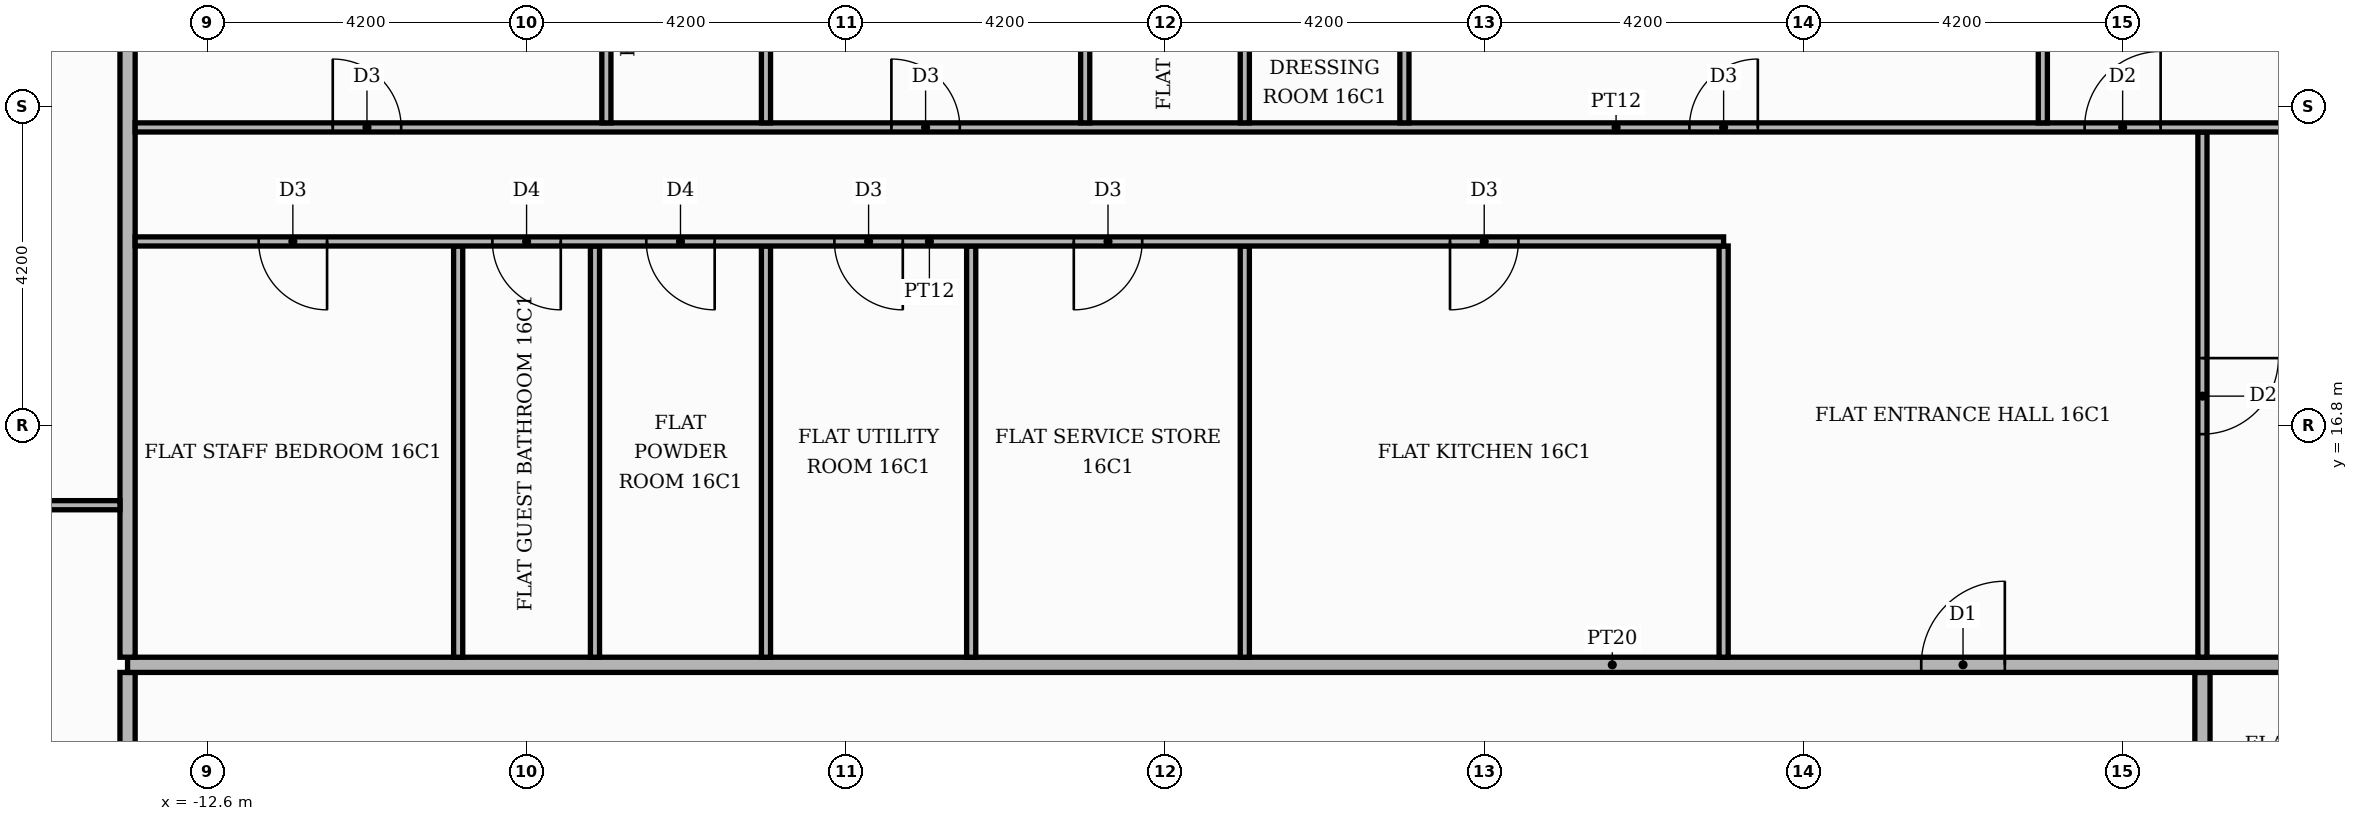
"""IFC4 building model, lengths in metres.
Left out: names, types, materials, properties, quantities, classifications, styles, units other than length and angle.
Written with IfcOpenShell. Run it as: python <this file> out.ifc"""

import sys

from ifc_helpers import new_model, si_unit, direction, frame, frame_2d, origin, place, context, subcontext, project, spatial, rectangle, extrude, element, fill, save


model = new_model("IFC4")
c1 = context("Model", 3, precision=1e-05, world=origin(), true_north=direction((0.0, 1.0)))
c2 = subcontext(c1, "Body", "Model", "MODEL_VIEW")
j1 = project(units=[si_unit("LENGTHUNIT", "METRE"), si_unit("PLANEANGLEUNIT", "RADIAN")], contexts=[c1])
p1 = place(None, origin())
s1 = spatial("IfcSite", under=j1, at=p1, CompositionType="ELEMENT")
p2 = place(p1, origin())
s2 = spatial("IfcBuilding", under=s1, at=p2, CompositionType="ELEMENT")
p3 = place(p2, frame((0.0, 0.0, 69.9)))
s3 = spatial("IfcBuildingStorey", under=s2, at=p3, CompositionType="ELEMENT", Elevation=69.9)
p4 = place(p3, frame((13.65, -5.15, 0.0), z_axis=(0.0, 0.0, 1.0), x_axis=(0.0, 1.0, 0.0)))
e1 = element("IfcWall", 1, at=p4, inside=s3, PredefinedType="PARTITIONING", context=c2, shape_type="SweptSolid", body=[
    extrude(rectangle(XDim=18.7, YDim=0.2, at=frame_2d((9.35, 0.0))), origin(), (0.0, 0.0, 1.0), 3.4),
])
p5 = place(p4, frame((5.65, 0.0, 0.0)))
e2 = element("IfcOpeningElement", 2, at=p5, cuts=e1, PredefinedType="OPENING", context=c2, shape_type="SweptSolid", body=[
    extrude(rectangle(XDim=1.1, YDim=2.4, at=frame_2d((0.55, 1.2))), frame((0.0, 0.11, 0.0), z_axis=(0.0, -1.0, 0.0), x_axis=(1.0, 0.0, 0.0)), (0.0, 0.0, 1.0), 0.22),
])
p6 = place(p3, frame((-13.65, 5.35, 0.0), z_axis=(0.0, 0.0, 1.0), x_axis=(0.0, 1.0, 0.0)))
e3 = element("IfcWall", 3, at=p6, inside=s3, PredefinedType="PARTITIONING", context=c2, shape_type="SweptSolid", body=[
    extrude(rectangle(XDim=8.2, YDim=0.2, at=frame_2d((4.1, 0.0))), origin(), (0.0, 0.0, 1.0), 3.4),
])
p7 = place(p6, frame((5.65, 0.0, 0.0)))
e4 = element("IfcOpeningElement", 4, at=p7, cuts=e3, PredefinedType="OPENING", context=c2, shape_type="SweptSolid", body=[
    extrude(rectangle(XDim=1.1, YDim=2.4, at=frame_2d((0.55, 1.2))), frame((0.0, 0.11, 0.0), z_axis=(0.0, -1.0, 0.0), x_axis=(1.0, 0.0, 0.0)), (0.0, 0.0, 1.0), 0.22),
])
p8 = place(p3, frame((-13.65, 13.65, 0.0), z_axis=(0.0, 0.0, 1.0), x_axis=(1.0, 0.0, 0.0)))
e5 = element("IfcWall", 5, at=p8, inside=s3, PredefinedType="PARTITIONING", context=c2, shape_type="SweptSolid", body=[
    extrude(rectangle(XDim=39.07, YDim=0.2, at=frame_2d((19.535, 0.0))), origin(), (0.0, 0.0, 1.0), 3.4),
])
p9 = place(p8, frame((23.6, 0.0, 0.0)))
e6 = element("IfcOpeningElement", 6, at=p9, cuts=e5, PredefinedType="OPENING", context=c2, shape_type="SweptSolid", body=[
    extrude(rectangle(XDim=1.1, YDim=2.4, at=frame_2d((0.55, 1.2))), frame((0.0, 0.11, 0.0), z_axis=(0.0, -1.0, 0.0), x_axis=(1.0, 0.0, 0.0)), (0.0, 0.0, 1.0), 0.22),
])
p10 = place(p3, frame((-13.65, 13.75, 0.0), z_axis=(0.0, 0.0, 1.0), x_axis=(0.0, 1.0, 0.0)))
e7 = element("IfcWall", 7, at=p10, inside=s3, PredefinedType="PARTITIONING", context=c2, shape_type="SweptSolid", body=[
    extrude(rectangle(XDim=11.67, YDim=0.2, at=frame_2d((5.835, 0.0))), origin(), (0.0, 0.0, 1.0), 3.4),
])
for number, where, z_axis, x_axis in (
    (8, (-9.3, 13.75, 0.0), (0.0, 0.0, 1.0), (0.0, 1.0, 0.0)),
    (9, (-7.5, 13.75, 0.0), (0.0, 0.0, 1.0), (0.0, 1.0, 0.0)),
    (10, (-5.25, 13.75, 0.0), (0.0, 0.0, 1.0), (0.0, 1.0, 0.0)),
    (11, (-2.55, 13.75, 0.0), (0.0, 0.0, 1.0), (0.0, 1.0, 0.0)),
    (12, (1.05, 13.75, 0.0), (0.0, 0.0, 1.0), (0.0, 1.0, 0.0)),
    (13, (7.35, 13.75, 0.0), (0.0, 0.0, 1.0), (0.0, 1.0, 0.0)),
):
    element("IfcWall", number, at=place(p3, frame(where, z_axis=z_axis, x_axis=x_axis)), inside=s3, PredefinedType="PARTITIONING", context=c2, shape_type="SweptSolid", body=[
        extrude(rectangle(XDim=5.41, YDim=0.12, at=frame_2d((2.705, 0.0))), origin(), (0.0, 0.0, 1.0), 3.4),
    ])
p11 = place(p3, frame((13.65, 13.75, 0.0), z_axis=(0.0, 0.0, 1.0), x_axis=(0.0, 1.0, 0.0)))
e14 = element("IfcWall", 14, at=p11, inside=s3, PredefinedType="PARTITIONING", context=c2, shape_type="SweptSolid", body=[
    extrude(rectangle(XDim=6.91, YDim=0.12, at=frame_2d((3.455, 0.0))), origin(), (0.0, 0.0, 1.0), 3.4),
])
p12 = place(p11, frame((2.935, 0.0, 0.0)))
e15 = element("IfcOpeningElement", 15, at=p12, cuts=e14, PredefinedType="OPENING", context=c2, shape_type="SweptSolid", body=[
    extrude(rectangle(XDim=1.0, YDim=2.1, at=frame_2d((0.5, 1.05))), frame((0.0, 0.07, 0.0), z_axis=(0.0, -1.0, 0.0), x_axis=(1.0, 0.0, 0.0)), (0.0, 0.0, 1.0), 0.14),
])
p13 = place(p3, frame((-20.12, 15.75, 0.0), z_axis=(0.0, 0.0, 1.0), x_axis=(1.0, 0.0, 0.0)))
e16 = element("IfcWall", 16, at=p13, inside=s3, PredefinedType="PARTITIONING", context=c2, shape_type="SweptSolid", body=[
    extrude(rectangle(XDim=6.37, YDim=0.12, at=frame_2d((3.185, 0.0))), origin(), (0.0, 0.0, 1.0), 3.4),
])
p14 = place(p13, frame((2.735, 0.0, 0.0)))
e17 = element("IfcOpeningElement", 17, at=p14, cuts=e16, PredefinedType="OPENING", context=c2, shape_type="SweptSolid", body=[
    extrude(rectangle(XDim=1.0, YDim=2.1, at=frame_2d((0.5, 1.05))), frame((0.0, 0.07, 0.0), z_axis=(0.0, -1.0, 0.0), x_axis=(1.0, 0.0, 0.0)), (0.0, 0.0, 1.0), 0.14),
])
p15 = place(p3, frame((-13.55, 19.22, 0.0), z_axis=(0.0, 0.0, 1.0), x_axis=(1.0, 0.0, 0.0)))
e18 = element("IfcWall", 18, at=p15, inside=s3, PredefinedType="PARTITIONING", context=c2, shape_type="SweptSolid", body=[
    extrude(rectangle(XDim=20.9, YDim=0.12, at=frame_2d((10.45, 0.0))), origin(), (0.0, 0.0, 1.0), 3.4),
])
p16 = place(p15, frame((17.3, 0.0, 0.0)))
e19 = element("IfcOpeningElement", 19, at=p16, cuts=e18, PredefinedType="OPENING", context=c2, shape_type="SweptSolid", body=[
    extrude(rectangle(XDim=0.9, YDim=2.1, at=frame_2d((0.45, 1.05))), frame((0.0, 0.07, 0.0), z_axis=(0.0, -1.0, 0.0), x_axis=(1.0, 0.0, 0.0)), (0.0, 0.0, 1.0), 0.14),
])
p17 = place(p15, frame((12.35, 0.0, 0.0)))
e20 = element("IfcOpeningElement", 20, at=p17, cuts=e18, PredefinedType="OPENING", context=c2, shape_type="SweptSolid", body=[
    extrude(rectangle(XDim=0.9, YDim=2.1, at=frame_2d((0.45, 1.05))), frame((0.0, 0.07, 0.0), z_axis=(0.0, -1.0, 0.0), x_axis=(1.0, 0.0, 0.0)), (0.0, 0.0, 1.0), 0.14),
])
p18 = place(p15, frame((9.2, 0.0, 0.0)))
e21 = element("IfcOpeningElement", 21, at=p18, cuts=e18, PredefinedType="OPENING", context=c2, shape_type="SweptSolid", body=[
    extrude(rectangle(XDim=0.9, YDim=2.1, at=frame_2d((0.45, 1.05))), frame((0.0, 0.07, 0.0), z_axis=(0.0, -1.0, 0.0), x_axis=(1.0, 0.0, 0.0)), (0.0, 0.0, 1.0), 0.14),
])
p19 = place(p15, frame((6.725, 0.0, 0.0)))
e22 = element("IfcOpeningElement", 22, at=p19, cuts=e18, PredefinedType="OPENING", context=c2, shape_type="SweptSolid", body=[
    extrude(rectangle(XDim=0.9, YDim=2.1, at=frame_2d((0.45, 1.05))), frame((0.0, 0.07, 0.0), z_axis=(0.0, -1.0, 0.0), x_axis=(1.0, 0.0, 0.0)), (0.0, 0.0, 1.0), 0.14),
])
p20 = place(p15, frame((4.7, 0.0, 0.0)))
e23 = element("IfcOpeningElement", 23, at=p20, cuts=e18, PredefinedType="OPENING", context=c2, shape_type="SweptSolid", body=[
    extrude(rectangle(XDim=0.9, YDim=2.1, at=frame_2d((0.45, 1.05))), frame((0.0, 0.07, 0.0), z_axis=(0.0, -1.0, 0.0), x_axis=(1.0, 0.0, 0.0)), (0.0, 0.0, 1.0), 0.14),
])
p21 = place(p15, frame((1.625, 0.0, 0.0)))
e24 = element("IfcOpeningElement", 24, at=p21, cuts=e18, PredefinedType="OPENING", context=c2, shape_type="SweptSolid", body=[
    extrude(rectangle(XDim=0.9, YDim=2.1, at=frame_2d((0.45, 1.05))), frame((0.0, 0.07, 0.0), z_axis=(0.0, -1.0, 0.0), x_axis=(1.0, 0.0, 0.0)), (0.0, 0.0, 1.0), 0.14),
])
p22 = place(p3, frame((-13.55, 20.72, 0.0), z_axis=(0.0, 0.0, 1.0), x_axis=(1.0, 0.0, 0.0)))
e25 = element("IfcWall", 25, at=p22, inside=s3, PredefinedType="PARTITIONING", context=c2, shape_type="SweptSolid", body=[
    extrude(rectangle(XDim=38.97, YDim=0.12, at=frame_2d((19.485, 0.0))), origin(), (0.0, 0.0, 1.0), 3.4),
])
p23 = place(p22, frame((25.65, 0.0, 0.0)))
e26 = element("IfcOpeningElement", 26, at=p23, cuts=e25, PredefinedType="OPENING", context=c2, shape_type="SweptSolid", body=[
    extrude(rectangle(XDim=1.0, YDim=2.1, at=frame_2d((0.5, 1.05))), frame((0.0, 0.07, 0.0), z_axis=(0.0, -1.0, 0.0), x_axis=(1.0, 0.0, 0.0)), (0.0, 0.0, 1.0), 0.14),
])
p24 = place(p22, frame((20.45, 0.0, 0.0)))
e27 = element("IfcOpeningElement", 27, at=p24, cuts=e25, PredefinedType="OPENING", context=c2, shape_type="SweptSolid", body=[
    extrude(rectangle(XDim=0.9, YDim=2.1, at=frame_2d((0.45, 1.05))), frame((0.0, 0.07, 0.0), z_axis=(0.0, -1.0, 0.0), x_axis=(1.0, 0.0, 0.0)), (0.0, 0.0, 1.0), 0.14),
])
p25 = place(p22, frame((9.95, 0.0, 0.0)))
e28 = element("IfcOpeningElement", 28, at=p25, cuts=e25, PredefinedType="OPENING", context=c2, shape_type="SweptSolid", body=[
    extrude(rectangle(XDim=0.9, YDim=2.1, at=frame_2d((0.45, 1.05))), frame((0.0, 0.07, 0.0), z_axis=(0.0, -1.0, 0.0), x_axis=(1.0, 0.0, 0.0)), (0.0, 0.0, 1.0), 0.14),
])
p26 = place(p22, frame((2.6, 0.0, 0.0)))
e29 = element("IfcOpeningElement", 29, at=p26, cuts=e25, PredefinedType="OPENING", context=c2, shape_type="SweptSolid", body=[
    extrude(rectangle(XDim=0.9, YDim=2.1, at=frame_2d((0.45, 1.05))), frame((0.0, 0.07, 0.0), z_axis=(0.0, -1.0, 0.0), x_axis=(1.0, 0.0, 0.0)), (0.0, 0.0, 1.0), 0.14),
])
p27 = place(p3, frame((-7.35, 20.78, 0.0), z_axis=(0.0, 0.0, 1.0), x_axis=(0.0, 1.0, 0.0)))
e30 = element("IfcWall", 30, at=p27, inside=s3, PredefinedType="PARTITIONING", context=c2, shape_type="SweptSolid", body=[
    extrude(rectangle(XDim=4.64, YDim=0.12, at=frame_2d((2.32, 0.0))), origin(), (0.0, 0.0, 1.0), 3.4),
])
p28 = place(p3, frame((-5.25, 20.78, 0.0), z_axis=(0.0, 0.0, 1.0), x_axis=(0.0, 1.0, 0.0)))
e31 = element("IfcWall", 31, at=p28, inside=s3, PredefinedType="PARTITIONING", context=c2, shape_type="SweptSolid", body=[
    extrude(rectangle(XDim=4.64, YDim=0.12, at=frame_2d((2.32, 0.0))), origin(), (0.0, 0.0, 1.0), 3.4),
])
p29 = place(p28, frame((1.99, 0.0, 0.0)))
e32 = element("IfcOpeningElement", 32, at=p29, cuts=e31, PredefinedType="OPENING", context=c2, shape_type="SweptSolid", body=[
    extrude(rectangle(XDim=0.9, YDim=2.1, at=frame_2d((0.45, 1.05))), frame((0.0, 0.07, 0.0), z_axis=(0.0, -1.0, 0.0), x_axis=(1.0, 0.0, 0.0)), (0.0, 0.0, 1.0), 0.14),
])
p30 = place(p3, frame((-1.05, 20.78, 0.0), z_axis=(0.0, 0.0, 1.0), x_axis=(0.0, 1.0, 0.0)))
e33 = element("IfcWall", 33, at=p30, inside=s3, PredefinedType="PARTITIONING", context=c2, shape_type="SweptSolid", body=[
    extrude(rectangle(XDim=4.64, YDim=0.12, at=frame_2d((2.32, 0.0))), origin(), (0.0, 0.0, 1.0), 3.4),
])
p31 = place(p3, frame((1.05, 20.78, 0.0), z_axis=(0.0, 0.0, 1.0), x_axis=(0.0, 1.0, 0.0)))
e34 = element("IfcWall", 34, at=p31, inside=s3, PredefinedType="PARTITIONING", context=c2, shape_type="SweptSolid", body=[
    extrude(rectangle(XDim=4.64, YDim=0.12, at=frame_2d((2.32, 0.0))), origin(), (0.0, 0.0, 1.0), 3.4),
])
p32 = place(p31, frame((1.99, 0.0, 0.0)))
e35 = element("IfcOpeningElement", 35, at=p32, cuts=e34, PredefinedType="OPENING", context=c2, shape_type="SweptSolid", body=[
    extrude(rectangle(XDim=0.9, YDim=2.1, at=frame_2d((0.45, 1.05))), frame((0.0, 0.07, 0.0), z_axis=(0.0, -1.0, 0.0), x_axis=(1.0, 0.0, 0.0)), (0.0, 0.0, 1.0), 0.14),
])
p33 = place(p3, frame((3.15, 20.78, 0.0), z_axis=(0.0, 0.0, 1.0), x_axis=(0.0, 1.0, 0.0)))
e36 = element("IfcWall", 36, at=p33, inside=s3, PredefinedType="PARTITIONING", context=c2, shape_type="SweptSolid", body=[
    extrude(rectangle(XDim=4.64, YDim=0.12, at=frame_2d((2.32, 0.0))), origin(), (0.0, 0.0, 1.0), 3.4),
])
p34 = place(p33, frame((1.99, 0.0, 0.0)))
e37 = element("IfcOpeningElement", 37, at=p34, cuts=e36, PredefinedType="OPENING", context=c2, shape_type="SweptSolid", body=[
    extrude(rectangle(XDim=0.9, YDim=2.1, at=frame_2d((0.45, 1.05))), frame((0.0, 0.07, 0.0), z_axis=(0.0, -1.0, 0.0), x_axis=(1.0, 0.0, 0.0)), (0.0, 0.0, 1.0), 0.14),
])
p35 = place(p3, frame((11.55, 20.78, 0.0), z_axis=(0.0, 0.0, 1.0), x_axis=(0.0, 1.0, 0.0)))
e38 = element("IfcWall", 38, at=p35, inside=s3, PredefinedType="PARTITIONING", context=c2, shape_type="SweptSolid", body=[
    extrude(rectangle(XDim=4.64, YDim=0.12, at=frame_2d((2.32, 0.0))), origin(), (0.0, 0.0, 1.0), 3.4),
])
p36 = place(p9, origin())
e39 = element("IfcDoor", 39, at=p36, inside=s3, OperationType="SINGLE_SWING_RIGHT", PredefinedType="DOOR", context=c2, shape_type="SweptSolid", body=[
    extrude(rectangle(XDim=1.1, YDim=2.4, at=frame_2d((0.55, 1.2))), frame((0.0, 0.025, 0.0), z_axis=(0.0, -1.0, 0.0), x_axis=(1.0, 0.0, 0.0)), (0.0, 0.0, 1.0), 0.05),
])
fill(e6, e39)
p37 = place(p12, frame((1.0, 0.0, 0.0), z_axis=(0.0, 0.0, 1.0), x_axis=(-1.0, 0.0, 0.0)))
e40 = element("IfcDoor", 40, at=p37, inside=s3, OperationType="SINGLE_SWING_RIGHT", PredefinedType="DOOR", context=c2, shape_type="SweptSolid", body=[
    extrude(rectangle(XDim=1.0, YDim=2.1, at=frame_2d((0.5, 1.05))), frame((0.0, 0.025, 0.0), z_axis=(0.0, -1.0, 0.0), x_axis=(1.0, 0.0, 0.0)), (0.0, 0.0, 1.0), 0.05),
])
fill(e15, e40)
p38 = place(p16, frame((0.9, 0.0, 0.0), z_axis=(0.0, 0.0, 1.0), x_axis=(-1.0, 0.0, 0.0)))
e41 = element("IfcDoor", 41, at=p38, inside=s3, OperationType="SINGLE_SWING_LEFT", PredefinedType="DOOR", context=c2, shape_type="SweptSolid", body=[
    extrude(rectangle(XDim=0.9, YDim=2.1, at=frame_2d((0.45, 1.05))), frame((0.0, 0.025, 0.0), z_axis=(0.0, -1.0, 0.0), x_axis=(1.0, 0.0, 0.0)), (0.0, 0.0, 1.0), 0.05),
])
fill(e19, e41)
p39 = place(p17, frame((0.9, 0.0, 0.0), z_axis=(0.0, 0.0, 1.0), x_axis=(-1.0, 0.0, 0.0)))
e42 = element("IfcDoor", 42, at=p39, inside=s3, OperationType="SINGLE_SWING_LEFT", PredefinedType="DOOR", context=c2, shape_type="SweptSolid", body=[
    extrude(rectangle(XDim=0.9, YDim=2.1, at=frame_2d((0.45, 1.05))), frame((0.0, 0.025, 0.0), z_axis=(0.0, -1.0, 0.0), x_axis=(1.0, 0.0, 0.0)), (0.0, 0.0, 1.0), 0.05),
])
fill(e20, e42)
p40 = place(p18, frame((0.9, 0.0, 0.0), z_axis=(0.0, 0.0, 1.0), x_axis=(-1.0, 0.0, 0.0)))
e43 = element("IfcDoor", 43, at=p40, inside=s3, OperationType="SINGLE_SWING_RIGHT", PredefinedType="DOOR", context=c2, shape_type="SweptSolid", body=[
    extrude(rectangle(XDim=0.9, YDim=2.1, at=frame_2d((0.45, 1.05))), frame((0.0, 0.025, 0.0), z_axis=(0.0, -1.0, 0.0), x_axis=(1.0, 0.0, 0.0)), (0.0, 0.0, 1.0), 0.05),
])
fill(e21, e43)
p41 = place(p19, frame((0.9, 0.0, 0.0), z_axis=(0.0, 0.0, 1.0), x_axis=(-1.0, 0.0, 0.0)))
e44 = element("IfcDoor", 44, at=p41, inside=s3, OperationType="SINGLE_SWING_RIGHT", PredefinedType="DOOR", context=c2, shape_type="SweptSolid", body=[
    extrude(rectangle(XDim=0.9, YDim=2.1, at=frame_2d((0.45, 1.05))), frame((0.0, 0.025, 0.0), z_axis=(0.0, -1.0, 0.0), x_axis=(1.0, 0.0, 0.0)), (0.0, 0.0, 1.0), 0.05),
])
fill(e22, e44)
p42 = place(p20, frame((0.9, 0.0, 0.0), z_axis=(0.0, 0.0, 1.0), x_axis=(-1.0, 0.0, 0.0)))
e45 = element("IfcDoor", 45, at=p42, inside=s3, OperationType="SINGLE_SWING_RIGHT", PredefinedType="DOOR", context=c2, shape_type="SweptSolid", body=[
    extrude(rectangle(XDim=0.9, YDim=2.1, at=frame_2d((0.45, 1.05))), frame((0.0, 0.025, 0.0), z_axis=(0.0, -1.0, 0.0), x_axis=(1.0, 0.0, 0.0)), (0.0, 0.0, 1.0), 0.05),
])
fill(e23, e45)
p43 = place(p21, frame((0.9, 0.0, 0.0), z_axis=(0.0, 0.0, 1.0), x_axis=(-1.0, 0.0, 0.0)))
e46 = element("IfcDoor", 46, at=p43, inside=s3, OperationType="SINGLE_SWING_RIGHT", PredefinedType="DOOR", context=c2, shape_type="SweptSolid", body=[
    extrude(rectangle(XDim=0.9, YDim=2.1, at=frame_2d((0.45, 1.05))), frame((0.0, 0.025, 0.0), z_axis=(0.0, -1.0, 0.0), x_axis=(1.0, 0.0, 0.0)), (0.0, 0.0, 1.0), 0.05),
])
fill(e24, e46)
p44 = place(p23, origin())
e47 = element("IfcDoor", 47, at=p44, inside=s3, OperationType="SINGLE_SWING_RIGHT", PredefinedType="DOOR", context=c2, shape_type="SweptSolid", body=[
    extrude(rectangle(XDim=1.0, YDim=2.1, at=frame_2d((0.5, 1.05))), frame((0.0, 0.025, 0.0), z_axis=(0.0, -1.0, 0.0), x_axis=(1.0, 0.0, 0.0)), (0.0, 0.0, 1.0), 0.05),
])
fill(e26, e47)
p45 = place(p24, origin())
e48 = element("IfcDoor", 48, at=p45, inside=s3, OperationType="SINGLE_SWING_RIGHT", PredefinedType="DOOR", context=c2, shape_type="SweptSolid", body=[
    extrude(rectangle(XDim=0.9, YDim=2.1, at=frame_2d((0.45, 1.05))), frame((0.0, 0.025, 0.0), z_axis=(0.0, -1.0, 0.0), x_axis=(1.0, 0.0, 0.0)), (0.0, 0.0, 1.0), 0.05),
])
fill(e27, e48)
p46 = place(p25, origin())
e49 = element("IfcDoor", 49, at=p46, inside=s3, OperationType="SINGLE_SWING_LEFT", PredefinedType="DOOR", context=c2, shape_type="SweptSolid", body=[
    extrude(rectangle(XDim=0.9, YDim=2.1, at=frame_2d((0.45, 1.05))), frame((0.0, 0.025, 0.0), z_axis=(0.0, -1.0, 0.0), x_axis=(1.0, 0.0, 0.0)), (0.0, 0.0, 1.0), 0.05),
])
fill(e28, e49)
p47 = place(p26, origin())
e50 = element("IfcDoor", 50, at=p47, inside=s3, OperationType="SINGLE_SWING_LEFT", PredefinedType="DOOR", context=c2, shape_type="SweptSolid", body=[
    extrude(rectangle(XDim=0.9, YDim=2.1, at=frame_2d((0.45, 1.05))), frame((0.0, 0.025, 0.0), z_axis=(0.0, -1.0, 0.0), x_axis=(1.0, 0.0, 0.0)), (0.0, 0.0, 1.0), 0.05),
])
fill(e29, e50)
save(model, sys.argv[1])
